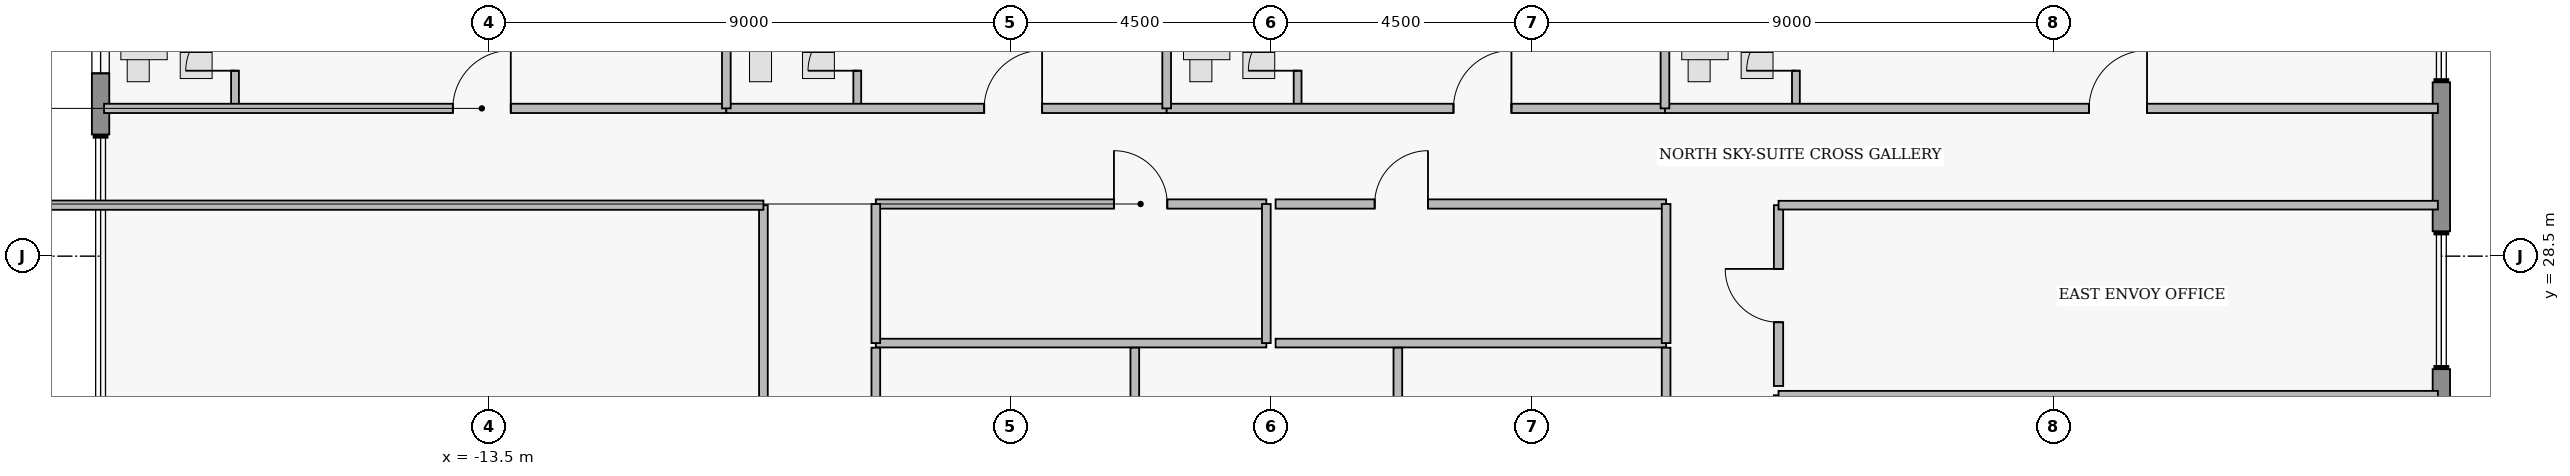
"""IFC4 building model, lengths in metres.
Left out: names, types, materials, properties, quantities, classifications, styles, units other than length and angle.
Written with IfcOpenShell. Run it as: python <this file> out.ifc"""

import sys

from ifc_helpers import new_model, si_unit, direction, frame, frame_2d, origin, place, context, subcontext, project, spatial, rectangle, extrude, element, fill, save


model = new_model("IFC4")
c1 = context("Model", 3, precision=1e-05, world=origin(), true_north=direction((0.0, 1.0)))
c2 = subcontext(c1, "Body", "Model", "MODEL_VIEW")
j1 = project(units=[si_unit("LENGTHUNIT", "METRE"), si_unit("PLANEANGLEUNIT", "RADIAN")], contexts=[c1])
p1 = place(None, origin())
s1 = spatial("IfcSite", under=j1, at=p1, CompositionType="ELEMENT")
p2 = place(p1, origin())
s2 = spatial("IfcBuilding", under=s1, at=p2, CompositionType="ELEMENT")
p3 = place(p2, frame((0.0, 0.0, 280.35)))
s3 = spatial("IfcBuildingStorey", under=s2, at=p3, CompositionType="ELEMENT", Elevation=280.35)
p4 = place(p3, frame((-20.2, 30.6, 0.0), z_axis=(0.0, 0.0, 1.0), x_axis=(0.0, 1.0, 0.0)))
e1 = element("IfcWall", 1, at=p4, inside=s3, PredefinedType="STANDARD", context=c2, shape_type="SweptSolid", body=[
    extrude(rectangle(XDim=5.0, YDim=0.3, at=frame_2d((2.5, 0.0))), origin(), (0.0, 0.0, 1.0), 3.48),
])
p5 = place(p4, frame((1.055, 0.0, 0.95)))
e2 = element("IfcOpeningElement", 2, at=p5, cuts=e1, PredefinedType="OPENING", context=c2, shape_type="SweptSolid", body=[
    extrude(rectangle(XDim=1.15, YDim=1.55, at=frame_2d((0.575, 0.775))), frame((0.0, 0.16, 0.0), z_axis=(0.0, -1.0, 0.0), x_axis=(1.0, 0.0, 0.0)), (0.0, 0.0, 1.0), 0.32),
])
p6 = place(p4, frame((3.27, 0.0, 0.95)))
e3 = element("IfcOpeningElement", 3, at=p6, cuts=e1, PredefinedType="OPENING", context=c2, shape_type="SweptSolid", body=[
    extrude(rectangle(XDim=1.15, YDim=1.55, at=frame_2d((0.575, 0.775))), frame((0.0, 0.16, 0.0), z_axis=(0.0, -1.0, 0.0), x_axis=(1.0, 0.0, 0.0)), (0.0, 0.0, 1.0), 0.32),
])
p7 = place(p3, frame((20.2, 31.5, 0.0), z_axis=(0.0, 0.0, 1.0), x_axis=(0.0, -1.0, 0.0)))
e4 = element("IfcWall", 4, at=p7, inside=s3, PredefinedType="STANDARD", context=c2, shape_type="SweptSolid", body=[
    extrude(rectangle(XDim=2.57, YDim=0.3, at=frame_2d((1.285, 0.0))), origin(), (0.0, 0.0, 1.0), 3.48),
])
p8 = place(p3, frame((20.2, 26.55, 0.0), z_axis=(0.0, 0.0, 1.0), x_axis=(0.0, -1.0, 0.0)))
e5 = element("IfcWall", 5, at=p8, inside=s3, PredefinedType="STANDARD", context=c2, shape_type="SweptSolid", body=[
    extrude(rectangle(XDim=2.45, YDim=0.3, at=frame_2d((1.225, 0.0))), origin(), (0.0, 0.0, 1.0), 3.48),
])
p9 = place(p8, frame((0.815, 0.0, 0.95)))
e6 = element("IfcOpeningElement", 6, at=p9, cuts=e5, PredefinedType="OPENING", context=c2, shape_type="SweptSolid", body=[
    extrude(rectangle(XDim=1.15, YDim=1.55, at=frame_2d((0.575, 0.775))), frame((0.0, 0.16, 0.0), z_axis=(0.0, -1.0, 0.0), x_axis=(1.0, 0.0, 0.0)), (0.0, 0.0, 1.0), 0.32),
])
p10 = place(p3, frame((-17.88, 31.05, 0.0), z_axis=(0.0, 0.0, 1.0), x_axis=(0.0, 1.0, 0.0)))
e7 = element("IfcWall", 7, at=p10, inside=s3, PredefinedType="PLUMBINGWALL", context=c2, shape_type="SweptSolid", body=[
    extrude(rectangle(XDim=2.36, YDim=0.135, at=frame_2d((1.18, 0.0))), origin(), (0.0, 0.0, 1.0), 3.48),
])
p11 = place(p10, frame((0.65, 0.0, 0.0)))
e8 = element("IfcOpeningElement", 8, at=p11, cuts=e7, PredefinedType="OPENING", context=c2, shape_type="SweptSolid", body=[
    extrude(rectangle(XDim=0.85, YDim=2.1, at=frame_2d((0.425, 1.05))), frame((0.0, 0.077, 0.0), z_axis=(0.0, -1.0, 0.0), x_axis=(1.0, 0.0, 0.0)), (0.0, 0.0, 1.0), 0.155),
])
p12 = place(p3, frame((-20.14, 31.05, 0.0), z_axis=(0.0, 0.0, 1.0), x_axis=(1.0, 0.0, 0.0)))
e9 = element("IfcWall", 9, at=p12, inside=s3, PredefinedType="PARTITIONING", context=c2, shape_type="SweptSolid", body=[
    extrude(rectangle(XDim=10.74, YDim=0.16, at=frame_2d((5.37, 0.0))), origin(), (0.0, 0.0, 1.0), 3.48),
])
p13 = place(p12, frame((6.02, 0.0, 0.0)))
e10 = element("IfcOpeningElement", 10, at=p13, cuts=e9, PredefinedType="OPENING", context=c2, shape_type="SweptSolid", body=[
    extrude(rectangle(XDim=1.0, YDim=2.15, at=frame_2d((0.5, 1.075))), frame((0.0, 0.09, 0.0), z_axis=(0.0, -1.0, 0.0), x_axis=(1.0, 0.0, 0.0)), (0.0, 0.0, 1.0), 0.18),
])
p14 = place(p3, frame((-7.14, 31.05, 0.0), z_axis=(0.0, 0.0, 1.0), x_axis=(0.0, 1.0, 0.0)))
e11 = element("IfcWall", 11, at=p14, inside=s3, PredefinedType="PLUMBINGWALL", context=c2, shape_type="SweptSolid", body=[
    extrude(rectangle(XDim=2.36, YDim=0.135, at=frame_2d((1.18, 0.0))), origin(), (0.0, 0.0, 1.0), 3.48),
])
p15 = place(p14, frame((0.65, 0.0, 0.0)))
e12 = element("IfcOpeningElement", 12, at=p15, cuts=e11, PredefinedType="OPENING", context=c2, shape_type="SweptSolid", body=[
    extrude(rectangle(XDim=0.85, YDim=2.1, at=frame_2d((0.425, 1.05))), frame((0.0, 0.077, 0.0), z_axis=(0.0, -1.0, 0.0), x_axis=(1.0, 0.0, 0.0)), (0.0, 0.0, 1.0), 0.155),
])
p16 = place(p3, frame((-9.4, 31.05, 0.0), z_axis=(0.0, 0.0, 1.0), x_axis=(1.0, 0.0, 0.0)))
e13 = element("IfcWall", 13, at=p16, inside=s3, PredefinedType="PARTITIONING", context=c2, shape_type="SweptSolid", body=[
    extrude(rectangle(XDim=7.6, YDim=0.16, at=frame_2d((3.8, 0.0))), origin(), (0.0, 0.0, 1.0), 3.48),
])
p17 = place(p16, frame((4.45, 0.0, 0.0)))
e14 = element("IfcOpeningElement", 14, at=p17, cuts=e13, PredefinedType="OPENING", context=c2, shape_type="SweptSolid", body=[
    extrude(rectangle(XDim=1.0, YDim=2.15, at=frame_2d((0.5, 1.075))), frame((0.0, 0.09, 0.0), z_axis=(0.0, -1.0, 0.0), x_axis=(1.0, 0.0, 0.0)), (0.0, 0.0, 1.0), 0.18),
])
p18 = place(p3, frame((0.46, 31.05, 0.0), z_axis=(0.0, 0.0, 1.0), x_axis=(0.0, 1.0, 0.0)))
e15 = element("IfcWall", 15, at=p18, inside=s3, PredefinedType="PLUMBINGWALL", context=c2, shape_type="SweptSolid", body=[
    extrude(rectangle(XDim=2.36, YDim=0.135, at=frame_2d((1.18, 0.0))), origin(), (0.0, 0.0, 1.0), 3.48),
])
p19 = place(p18, frame((0.65, 0.0, 0.0)))
e16 = element("IfcOpeningElement", 16, at=p19, cuts=e15, PredefinedType="OPENING", context=c2, shape_type="SweptSolid", body=[
    extrude(rectangle(XDim=0.85, YDim=2.1, at=frame_2d((0.425, 1.05))), frame((0.0, 0.077, 0.0), z_axis=(0.0, -1.0, 0.0), x_axis=(1.0, 0.0, 0.0)), (0.0, 0.0, 1.0), 0.155),
])
p20 = place(p3, frame((-1.8, 31.05, 0.0), z_axis=(0.0, 0.0, 1.0), x_axis=(1.0, 0.0, 0.0)))
e17 = element("IfcWall", 17, at=p20, inside=s3, PredefinedType="PARTITIONING", context=c2, shape_type="SweptSolid", body=[
    extrude(rectangle(XDim=8.6, YDim=0.16, at=frame_2d((4.3, 0.0))), origin(), (0.0, 0.0, 1.0), 3.48),
])
p21 = place(p20, frame((4.95, 0.0, 0.0)))
e18 = element("IfcOpeningElement", 18, at=p21, cuts=e17, PredefinedType="OPENING", context=c2, shape_type="SweptSolid", body=[
    extrude(rectangle(XDim=1.0, YDim=2.15, at=frame_2d((0.5, 1.075))), frame((0.0, 0.09, 0.0), z_axis=(0.0, -1.0, 0.0), x_axis=(1.0, 0.0, 0.0)), (0.0, 0.0, 1.0), 0.18),
])
p22 = place(p3, frame((9.06, 31.05, 0.0), z_axis=(0.0, 0.0, 1.0), x_axis=(0.0, 1.0, 0.0)))
e19 = element("IfcWall", 19, at=p22, inside=s3, PredefinedType="PLUMBINGWALL", context=c2, shape_type="SweptSolid", body=[
    extrude(rectangle(XDim=2.36, YDim=0.135, at=frame_2d((1.18, 0.0))), origin(), (0.0, 0.0, 1.0), 3.48),
])
p23 = place(p22, frame((0.65, 0.0, 0.0)))
e20 = element("IfcOpeningElement", 20, at=p23, cuts=e19, PredefinedType="OPENING", context=c2, shape_type="SweptSolid", body=[
    extrude(rectangle(XDim=0.85, YDim=2.1, at=frame_2d((0.425, 1.05))), frame((0.0, 0.077, 0.0), z_axis=(0.0, -1.0, 0.0), x_axis=(1.0, 0.0, 0.0)), (0.0, 0.0, 1.0), 0.155),
])
p24 = place(p3, frame((6.8, 31.05, 0.0), z_axis=(0.0, 0.0, 1.0), x_axis=(1.0, 0.0, 0.0)))
e21 = element("IfcWall", 21, at=p24, inside=s3, PredefinedType="PARTITIONING", context=c2, shape_type="SweptSolid", body=[
    extrude(rectangle(XDim=13.34, YDim=0.16, at=frame_2d((6.67, 0.0))), origin(), (0.0, 0.0, 1.0), 3.48),
])
p25 = place(p24, frame((7.32, 0.0, 0.0)))
e22 = element("IfcOpeningElement", 22, at=p25, cuts=e21, PredefinedType="OPENING", context=c2, shape_type="SweptSolid", body=[
    extrude(rectangle(XDim=1.0, YDim=2.15, at=frame_2d((0.5, 1.075))), frame((0.0, 0.09, 0.0), z_axis=(0.0, -1.0, 0.0), x_axis=(1.0, 0.0, 0.0)), (0.0, 0.0, 1.0), 0.18),
])
p26 = place(p3, frame((-6.82, 29.4, 0.0), z_axis=(0.0, 0.0, 1.0), x_axis=(1.0, 0.0, 0.0)))
e23 = element("IfcWall", 23, at=p26, inside=s3, PredefinedType="PARTITIONING", context=c2, shape_type="SweptSolid", body=[
    extrude(rectangle(XDim=6.74, YDim=0.16, at=frame_2d((3.37, 0.0))), origin(), (0.0, 0.0, 1.0), 3.48),
])
p27 = place(p26, frame((4.11, 0.0, 0.0)))
e24 = element("IfcOpeningElement", 24, at=p27, cuts=e23, PredefinedType="OPENING", context=c2, shape_type="SweptSolid", body=[
    extrude(rectangle(XDim=0.92, YDim=2.12, at=frame_2d((0.46, 1.06))), frame((0.0, 0.09, 0.0), z_axis=(0.0, -1.0, 0.0), x_axis=(1.0, 0.0, 0.0)), (0.0, 0.0, 1.0), 0.18),
])
p28 = place(p3, frame((0.08, 29.4, 0.0), z_axis=(0.0, 0.0, 1.0), x_axis=(1.0, 0.0, 0.0)))
e25 = element("IfcWall", 25, at=p28, inside=s3, PredefinedType="PARTITIONING", context=c2, shape_type="SweptSolid", body=[
    extrude(rectangle(XDim=6.74, YDim=0.16, at=frame_2d((3.37, 0.0))), origin(), (0.0, 0.0, 1.0), 3.48),
])
p29 = place(p28, frame((1.71, 0.0, 0.0)))
e26 = element("IfcOpeningElement", 26, at=p29, cuts=e25, PredefinedType="OPENING", context=c2, shape_type="SweptSolid", body=[
    extrude(rectangle(XDim=0.92, YDim=2.12, at=frame_2d((0.46, 1.06))), frame((0.0, 0.09, 0.0), z_axis=(0.0, -1.0, 0.0), x_axis=(1.0, 0.0, 0.0)), (0.0, 0.0, 1.0), 0.18),
])
p30 = place(p3, frame((8.76, 21.46, 0.0), z_axis=(0.0, 0.0, 1.0), x_axis=(0.0, 1.0, 0.0)))
e27 = element("IfcWall", 27, at=p30, inside=s3, PredefinedType="PARTITIONING", context=c2, shape_type="SweptSolid", body=[
    extrude(rectangle(XDim=4.64, YDim=0.16, at=frame_2d((2.32, 0.0))), origin(), (0.0, 0.0, 1.0), 3.48),
])
p31 = place(p30, frame((1.86, 0.0, 0.0)))
e28 = element("IfcOpeningElement", 28, at=p31, cuts=e27, PredefinedType="OPENING", context=c2, shape_type="SweptSolid", body=[
    extrude(rectangle(XDim=0.92, YDim=2.12, at=frame_2d((0.46, 1.06))), frame((0.0, 0.09, 0.0), z_axis=(0.0, -1.0, 0.0), x_axis=(1.0, 0.0, 0.0)), (0.0, 0.0, 1.0), 0.18),
])
p32 = place(p3, frame((8.76, 26.26, 0.0), z_axis=(0.0, 0.0, 1.0), x_axis=(0.0, 1.0, 0.0)))
e29 = element("IfcWall", 29, at=p32, inside=s3, PredefinedType="PARTITIONING", context=c2, shape_type="SweptSolid", body=[
    extrude(rectangle(XDim=3.12, YDim=0.16, at=frame_2d((1.56, 0.0))), origin(), (0.0, 0.0, 1.0), 3.48),
])
p33 = place(p32, frame((1.1, 0.0, 0.0)))
e30 = element("IfcOpeningElement", 30, at=p33, cuts=e29, PredefinedType="OPENING", context=c2, shape_type="SweptSolid", body=[
    extrude(rectangle(XDim=0.92, YDim=2.12, at=frame_2d((0.46, 1.06))), frame((0.0, 0.09, 0.0), z_axis=(0.0, -1.0, 0.0), x_axis=(1.0, 0.0, 0.0)), (0.0, 0.0, 1.0), 0.18),
])
for number, where, z_axis, x_axis in (
    (31, (-9.4, 31.05, 0.0), (0.0, 0.0, 1.0), (0.0, 1.0, 0.0)),
    (32, (-1.8, 31.05, 0.0), (0.0, 0.0, 1.0), (0.0, 1.0, 0.0)),
    (33, (6.8, 31.05, 0.0), (0.0, 0.0, 1.0), (0.0, 1.0, 0.0)),
):
    element("IfcWall", number, at=place(p3, frame(where, z_axis=z_axis, x_axis=x_axis)), inside=s3, PredefinedType="PARTITIONING", context=c2, shape_type="SweptSolid", body=[
        extrude(rectangle(XDim=7.87, YDim=0.15, at=frame_2d((3.935, 0.0))), origin(), (0.0, 0.0, 1.0), 3.48),
    ])
p34 = place(p3, frame((-6.82, 27.0, 0.0), z_axis=(0.0, 0.0, 1.0), x_axis=(1.0, 0.0, 0.0)))
e34 = element("IfcWall", 34, at=p34, inside=s3, PredefinedType="PARTITIONING", context=c2, shape_type="SweptSolid", body=[
    extrude(rectangle(XDim=6.74, YDim=0.15, at=frame_2d((3.37, 0.0))), origin(), (0.0, 0.0, 1.0), 3.48),
])
for number, where, z_axis, x_axis in (
    (35, (-6.82, 27.0, 0.0), (0.0, 0.0, 1.0), (0.0, 1.0, 0.0)),
    (36, (-0.08, 27.0, 0.0), (0.0, 0.0, 1.0), (0.0, 1.0, 0.0)),
):
    element("IfcWall", number, at=place(p3, frame(where, z_axis=z_axis, x_axis=x_axis)), inside=s3, PredefinedType="PARTITIONING", context=c2, shape_type="SweptSolid", body=[
        extrude(rectangle(XDim=2.4, YDim=0.15, at=frame_2d((1.2, 0.0))), origin(), (0.0, 0.0, 1.0), 3.48),
    ])
p35 = place(p3, frame((0.08, 27.0, 0.0), z_axis=(0.0, 0.0, 1.0), x_axis=(1.0, 0.0, 0.0)))
e37 = element("IfcWall", 37, at=p35, inside=s3, PredefinedType="PARTITIONING", context=c2, shape_type="SweptSolid", body=[
    extrude(rectangle(XDim=6.74, YDim=0.15, at=frame_2d((3.37, 0.0))), origin(), (0.0, 0.0, 1.0), 3.48),
])
p36 = place(p3, frame((6.82, 27.0, 0.0), z_axis=(0.0, 0.0, 1.0), x_axis=(0.0, 1.0, 0.0)))
e38 = element("IfcWall", 38, at=p36, inside=s3, PredefinedType="PARTITIONING", context=c2, shape_type="SweptSolid", body=[
    extrude(rectangle(XDim=2.4, YDim=0.15, at=frame_2d((1.2, 0.0))), origin(), (0.0, 0.0, 1.0), 3.48),
])
for number, where, z_axis, x_axis in (
    (39, (-6.82, 16.7, 0.0), (0.0, 0.0, 1.0), (0.0, 1.0, 0.0)),
    (40, (-2.35, 16.7, 0.0), (0.0, 0.0, 1.0), (0.0, 1.0, 0.0)),
    (41, (2.19, 16.7, 0.0), (0.0, 0.0, 1.0), (0.0, 1.0, 0.0)),
    (42, (6.82, 16.7, 0.0), (0.0, 0.0, 1.0), (0.0, 1.0, 0.0)),
):
    element("IfcWall", number, at=place(p3, frame(where, z_axis=z_axis, x_axis=x_axis)), inside=s3, PredefinedType="PARTITIONING", context=c2, shape_type="SweptSolid", body=[
        extrude(rectangle(XDim=10.22, YDim=0.15, at=frame_2d((5.11, 0.0))), origin(), (0.0, 0.0, 1.0), 3.48),
    ])
for number, where, z_axis, x_axis in (
    (43, (8.76, 26.1, 0.0), (0.0, 0.0, 1.0), (1.0, 0.0, 0.0)),
    (44, (8.76, 29.38, 0.0), (0.0, 0.0, 1.0), (1.0, 0.0, 0.0)),
):
    element("IfcWall", number, at=place(p3, frame(where, z_axis=z_axis, x_axis=x_axis)), inside=s3, PredefinedType="PARTITIONING", context=c2, shape_type="SweptSolid", body=[
        extrude(rectangle(XDim=11.38, YDim=0.15, at=frame_2d((5.69, 0.0))), origin(), (0.0, 0.0, 1.0), 3.48),
    ])
p37 = place(p3, frame((-8.76, 16.7, 0.0), z_axis=(0.0, 0.0, 1.0), x_axis=(0.0, 1.0, 0.0)))
e45 = element("IfcWall", 45, at=p37, inside=s3, PredefinedType="PARTITIONING", context=c2, shape_type="SweptSolid", body=[
    extrude(rectangle(XDim=12.68, YDim=0.15, at=frame_2d((6.34, 0.0))), origin(), (0.0, 0.0, 1.0), 3.48),
])
p38 = place(p3, frame((-22.64, 29.38, 0.0), z_axis=(0.0, 0.0, 1.0), x_axis=(1.0, 0.0, 0.0)))
e46 = element("IfcWall", 46, at=p38, inside=s3, PredefinedType="PARTITIONING", context=c2, shape_type="SweptSolid", body=[
    extrude(rectangle(XDim=13.88, YDim=0.16, at=frame_2d((6.94, 0.0))), origin(), (0.0, 0.0, 1.0), 3.48),
])
p39 = place(p5, origin())
e47 = element("IfcWindow", 47, at=p39, inside=s3, PartitioningType="SINGLE_PANEL", PredefinedType="WINDOW", context=c2, shape_type="SweptSolid", body=[
    extrude(rectangle(XDim=1.15, YDim=1.55, at=frame_2d((0.575, 0.775))), frame((0.0, 0.03, 0.0), z_axis=(0.0, -1.0, 0.0), x_axis=(1.0, 0.0, 0.0)), (0.0, 0.0, 1.0), 0.06),
])
fill(e2, e47)
p40 = place(p11, origin())
e48 = element("IfcDoor", 48, at=p40, inside=s3, OperationType="SINGLE_SWING_LEFT", PredefinedType="DOOR", context=c2, shape_type="SweptSolid", body=[
    extrude(rectangle(XDim=0.85, YDim=2.1, at=frame_2d((0.425, 1.05))), frame((0.0, 0.025, 0.0), z_axis=(0.0, -1.0, 0.0), x_axis=(1.0, 0.0, 0.0)), (0.0, 0.0, 1.0), 0.05),
])
fill(e8, e48)
p41 = place(p13, origin())
e49 = element("IfcDoor", 49, at=p41, inside=s3, OperationType="SINGLE_SWING_RIGHT", PredefinedType="DOOR", context=c2, shape_type="SweptSolid", body=[
    extrude(rectangle(XDim=1.0, YDim=2.15, at=frame_2d((0.5, 1.075))), frame((0.0, 0.025, 0.0), z_axis=(0.0, -1.0, 0.0), x_axis=(1.0, 0.0, 0.0)), (0.0, 0.0, 1.0), 0.05),
])
fill(e10, e49)
p42 = place(p15, origin())
e50 = element("IfcDoor", 50, at=p42, inside=s3, OperationType="SINGLE_SWING_LEFT", PredefinedType="DOOR", context=c2, shape_type="SweptSolid", body=[
    extrude(rectangle(XDim=0.85, YDim=2.1, at=frame_2d((0.425, 1.05))), frame((0.0, 0.025, 0.0), z_axis=(0.0, -1.0, 0.0), x_axis=(1.0, 0.0, 0.0)), (0.0, 0.0, 1.0), 0.05),
])
fill(e12, e50)
p43 = place(p17, origin())
e51 = element("IfcDoor", 51, at=p43, inside=s3, OperationType="SINGLE_SWING_RIGHT", PredefinedType="DOOR", context=c2, shape_type="SweptSolid", body=[
    extrude(rectangle(XDim=1.0, YDim=2.15, at=frame_2d((0.5, 1.075))), frame((0.0, 0.025, 0.0), z_axis=(0.0, -1.0, 0.0), x_axis=(1.0, 0.0, 0.0)), (0.0, 0.0, 1.0), 0.05),
])
fill(e14, e51)
p44 = place(p19, origin())
e52 = element("IfcDoor", 52, at=p44, inside=s3, OperationType="SINGLE_SWING_LEFT", PredefinedType="DOOR", context=c2, shape_type="SweptSolid", body=[
    extrude(rectangle(XDim=0.85, YDim=2.1, at=frame_2d((0.425, 1.05))), frame((0.0, 0.025, 0.0), z_axis=(0.0, -1.0, 0.0), x_axis=(1.0, 0.0, 0.0)), (0.0, 0.0, 1.0), 0.05),
])
fill(e16, e52)
p45 = place(p21, origin())
e53 = element("IfcDoor", 53, at=p45, inside=s3, OperationType="SINGLE_SWING_RIGHT", PredefinedType="DOOR", context=c2, shape_type="SweptSolid", body=[
    extrude(rectangle(XDim=1.0, YDim=2.15, at=frame_2d((0.5, 1.075))), frame((0.0, 0.025, 0.0), z_axis=(0.0, -1.0, 0.0), x_axis=(1.0, 0.0, 0.0)), (0.0, 0.0, 1.0), 0.05),
])
fill(e18, e53)
p46 = place(p23, origin())
e54 = element("IfcDoor", 54, at=p46, inside=s3, OperationType="SINGLE_SWING_LEFT", PredefinedType="DOOR", context=c2, shape_type="SweptSolid", body=[
    extrude(rectangle(XDim=0.85, YDim=2.1, at=frame_2d((0.425, 1.05))), frame((0.0, 0.025, 0.0), z_axis=(0.0, -1.0, 0.0), x_axis=(1.0, 0.0, 0.0)), (0.0, 0.0, 1.0), 0.05),
])
fill(e20, e54)
p47 = place(p25, origin())
e55 = element("IfcDoor", 55, at=p47, inside=s3, OperationType="SINGLE_SWING_RIGHT", PredefinedType="DOOR", context=c2, shape_type="SweptSolid", body=[
    extrude(rectangle(XDim=1.0, YDim=2.15, at=frame_2d((0.5, 1.075))), frame((0.0, 0.025, 0.0), z_axis=(0.0, -1.0, 0.0), x_axis=(1.0, 0.0, 0.0)), (0.0, 0.0, 1.0), 0.05),
])
fill(e22, e55)
p48 = place(p27, origin())
e56 = element("IfcDoor", 56, at=p48, inside=s3, OperationType="SINGLE_SWING_LEFT", PredefinedType="DOOR", context=c2, shape_type="SweptSolid", body=[
    extrude(rectangle(XDim=0.92, YDim=2.12, at=frame_2d((0.46, 1.06))), frame((0.0, 0.025, 0.0), z_axis=(0.0, -1.0, 0.0), x_axis=(1.0, 0.0, 0.0)), (0.0, 0.0, 1.0), 0.05),
])
fill(e24, e56)
p49 = place(p29, origin())
e57 = element("IfcDoor", 57, at=p49, inside=s3, OperationType="SINGLE_SWING_RIGHT", PredefinedType="DOOR", context=c2, shape_type="SweptSolid", body=[
    extrude(rectangle(XDim=0.92, YDim=2.12, at=frame_2d((0.46, 1.06))), frame((0.0, 0.025, 0.0), z_axis=(0.0, -1.0, 0.0), x_axis=(1.0, 0.0, 0.0)), (0.0, 0.0, 1.0), 0.05),
])
fill(e26, e57)
p50 = place(p33, origin())
e58 = element("IfcDoor", 58, at=p50, inside=s3, OperationType="SINGLE_SWING_RIGHT", PredefinedType="DOOR", context=c2, shape_type="SweptSolid", body=[
    extrude(rectangle(XDim=0.92, YDim=2.12, at=frame_2d((0.46, 1.06))), frame((0.0, 0.025, 0.0), z_axis=(0.0, -1.0, 0.0), x_axis=(1.0, 0.0, 0.0)), (0.0, 0.0, 1.0), 0.05),
])
fill(e30, e58)
save(model, sys.argv[1])
